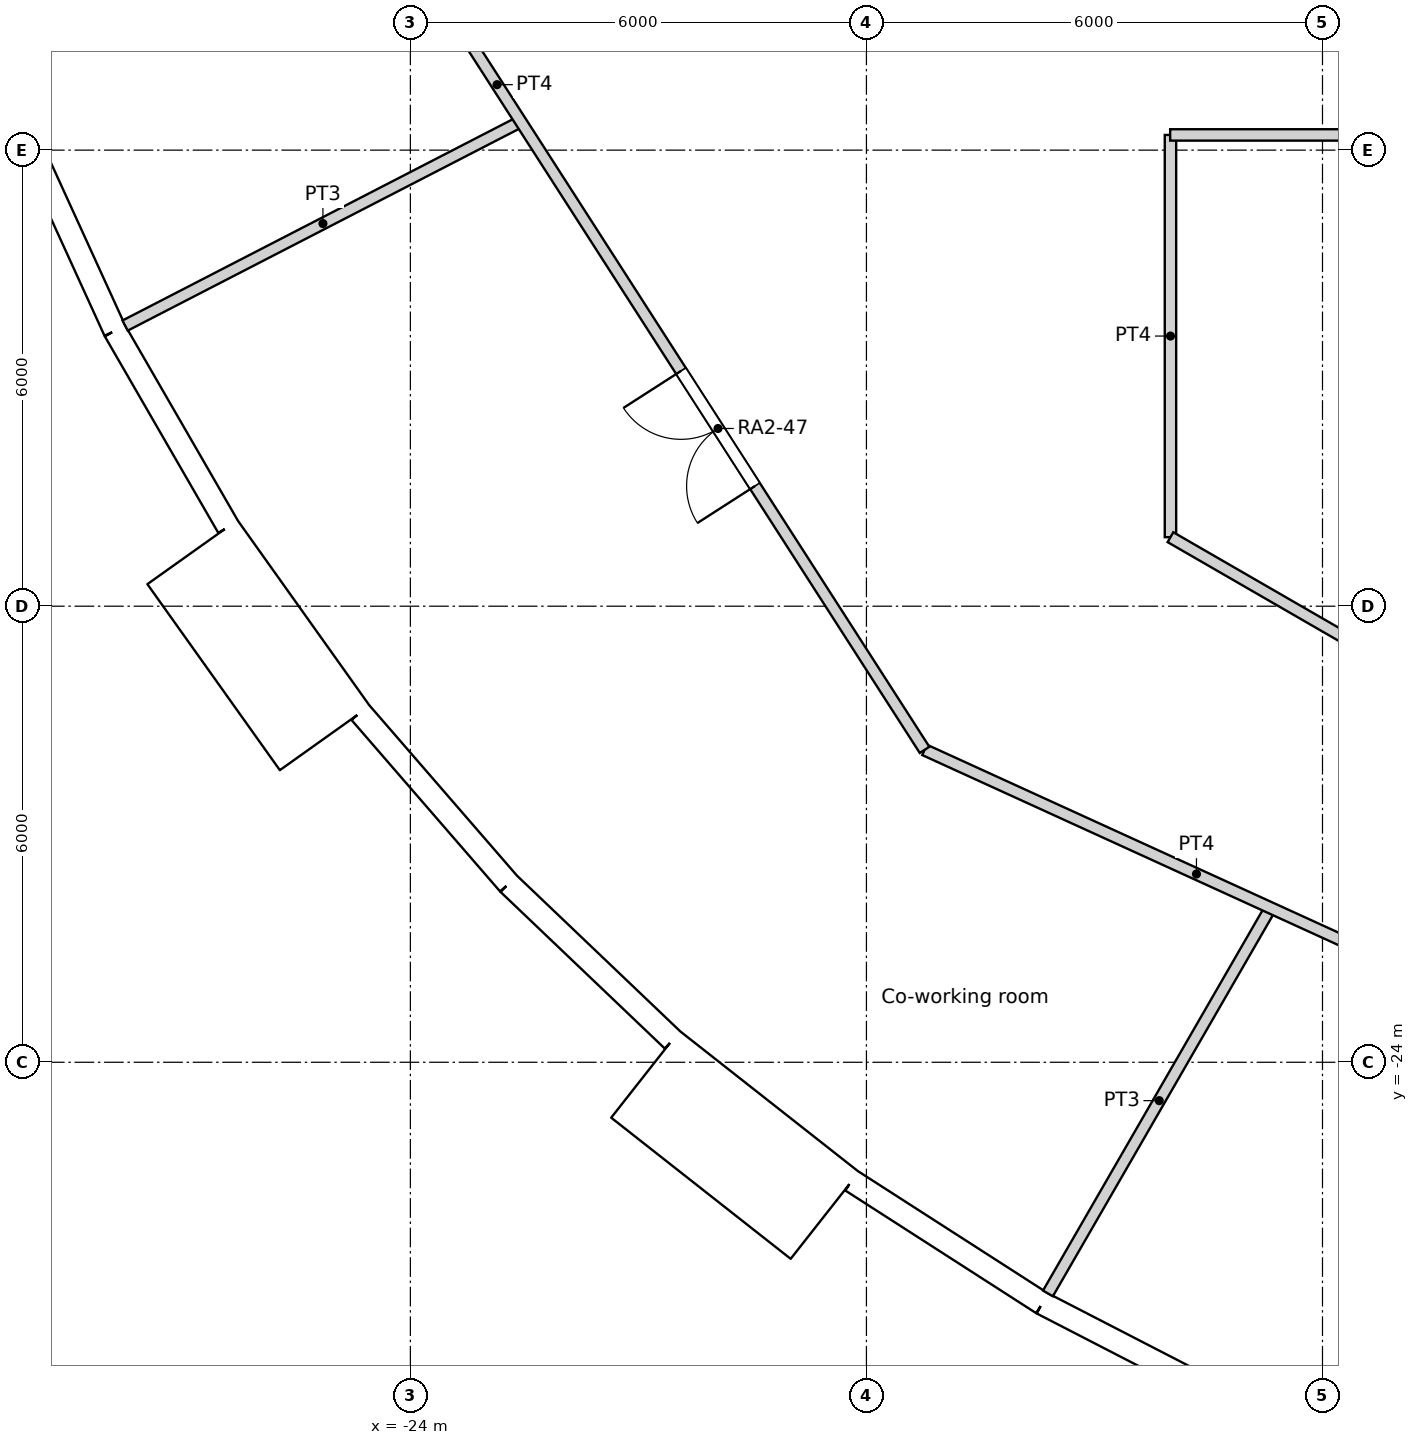
"""IFC4 building model, lengths in metres.
Left out: names, types, materials, properties, quantities, classifications, styles, units other than length and angle.
Written with IfcOpenShell. Run it as: python <this file> out.ifc"""

import sys

from ifc_helpers import new_model, si_unit, direction, frame, frame_2d, origin, origin_2d, place, context, subcontext, project, spatial, rectangle, circle, extrude, element, fill, save


model = new_model("IFC4")
c1 = context("Model", 3, precision=1e-05, world=origin(), true_north=direction((0.0, 1.0)))
c2 = subcontext(c1, "Body", "Model", "MODEL_VIEW")
j1 = project(units=[si_unit("LENGTHUNIT", "METRE"), si_unit("PLANEANGLEUNIT", "RADIAN")], contexts=[c1])
p1 = place(None, origin())
s1 = spatial("IfcSite", under=j1, at=p1, CompositionType="ELEMENT")
p2 = place(p1, origin())
s2 = spatial("IfcBuilding", under=s1, at=p2, CompositionType="ELEMENT")
p3 = place(p2, frame((0.0, 0.0, 39.0)))
s3 = spatial("IfcBuildingStorey", under=s2, at=p3, CompositionType="ELEMENT", Elevation=39.0)
for number, where, z_axis, x_axis in (
    (1, (-26.909, -13.873, 0.0), (0.0, 0.0, 1.0), (1.0, 0.0, 0.0)),
    (2, (-23.797, -18.715, 0.0), (0.0, 0.0, 1.0), (1.0, 0.0, 0.0)),
    (3, (-19.826, -22.88, 0.0), (0.0, 0.0, 1.0), (1.0, 0.0, 0.0)),
    (4, (-15.137, -26.219, 0.0), (0.0, 0.0, 1.0), (1.0, 0.0, 0.0)),
):
    element("IfcColumn", number, at=place(p3, frame(where, z_axis=z_axis, x_axis=x_axis)), inside=s3, PredefinedType="COLUMN", context=c2, shape_type="SweptSolid", body=[
        extrude(circle(Radius=0.7, at=origin_2d()), origin(), (0.0, 0.0, 1.0), 3.6),
    ])
for number, where, z_axis, x_axis in (
    (5, (-20.509, -13.489, 0.0), (0.0, 0.0, 1.0), (1.0, 0.0, 0.0)),
    (6, (-16.846, -17.855, 0.0), (0.0, 0.0, 1.0), (1.0, 0.0, 0.0)),
    (7, (-12.274, -21.259, 0.0), (0.0, 0.0, 1.0), (1.0, 0.0, 0.0)),
):
    element("IfcColumn", number, at=place(p3, frame(where, z_axis=z_axis, x_axis=x_axis)), inside=s3, PredefinedType="COLUMN", context=c2, shape_type="SweptSolid", body=[
        extrude(circle(Radius=0.75, at=origin_2d()), origin(), (0.0, 0.0, 1.0), 3.6),
    ])
p4 = place(p3, frame((-13.798, -12.802, 0.0), z_axis=(0.0, 0.0, 1.0), x_axis=(1.0, 0.0, 0.0)))
e8 = element("IfcColumn", 8, at=p4, inside=s3, PredefinedType="COLUMN", context=c2, shape_type="SweptSolid", body=[
    extrude(circle(Radius=0.8, at=origin_2d()), origin(), (0.0, 0.0, 1.0), 3.6),
])
p5 = place(p3, frame((-29.125, -11.666, 0.0), z_axis=(0.0, 0.0, 1.0), x_axis=(0.415407317162, -0.909635509888, 0.0)))
e9 = element("IfcWall", 9, at=p5, inside=s3, PredefinedType="SOLIDWALL", context=c2, shape_type="SweptSolid", body=[
    extrude(rectangle(XDim=2.98, YDim=0.3, at=frame_2d((1.49, 0.0))), origin(), (0.0, 0.0, 1.0), 3.15),
])
p6 = place(p5, frame((1.49, 0.0, 1.55)))
e10 = element("IfcOpeningElement", 10, at=p6, cuts=e9, PredefinedType="OPENING", context=c2, shape_type="SweptSolid", body=[
    extrude(circle(Radius=0.9, at=origin_2d()), frame((0.0, 0.16, 0.0), z_axis=(0.0, -1.0, 0.0), x_axis=(1.0, 0.0, 0.0)), (0.0, 0.0, 1.0), 0.32),
])
p7 = place(p3, frame((-27.887, -14.377, 0.0), z_axis=(0.0, 0.0, 1.0), x_axis=(0.499999078476, -0.866025935826, 0.0)))
e11 = element("IfcWall", 11, at=p7, inside=s3, PredefinedType="SOLIDWALL", context=c2, shape_type="SweptSolid", body=[
    extrude(rectangle(XDim=2.979, YDim=0.3, at=frame_2d((1.49, 0.0))), origin(), (0.0, 0.0, 1.0), 3.15),
])
p8 = place(p7, frame((1.49, 0.0, 1.55)))
e12 = element("IfcOpeningElement", 12, at=p8, cuts=e11, PredefinedType="OPENING", context=c2, shape_type="SweptSolid", body=[
    extrude(circle(Radius=0.9, at=origin_2d()), frame((0.0, 0.16, 0.0), z_axis=(0.0, -1.0, 0.0), x_axis=(1.0, 0.0, 0.0)), (0.0, 0.0, 1.0), 0.32),
])
p9 = place(p3, frame((-26.866, -17.29, -0.45), z_axis=(0.0, 0.0, 1.0), x_axis=(0.580090570606, -0.814551981088, 0.0)))
e13 = element("IfcWall", 13, at=p9, inside=s3, PredefinedType="ELEMENTEDWALL", context=c2, shape_type="SweptSolid", body=[
    extrude(rectangle(XDim=3.0, YDim=1.45, at=frame_2d((1.5, 0.0))), origin(), (0.0, 0.0, 1.0), 3.6),
])
p10 = place(p9, frame((1.5, 0.0, 2.0)))
e14 = element("IfcOpeningElement", 14, at=p10, cuts=e13, PredefinedType="OPENING", context=c2, shape_type="SweptSolid", body=[
    extrude(circle(Radius=0.9, at=origin_2d()), frame((0.0, 0.735, 0.0), z_axis=(0.0, -1.0, 0.0), x_axis=(1.0, 0.0, 0.0)), (0.0, 0.0, 1.0), 1.47),
])
p11 = place(p3, frame((-24.658, -19.399, 0.0), z_axis=(0.0, 0.0, 1.0), x_axis=(0.654830712471, -0.755775587066, 0.0)))
e15 = element("IfcWall", 15, at=p11, inside=s3, PredefinedType="SOLIDWALL", context=c2, shape_type="SweptSolid", body=[
    extrude(rectangle(XDim=2.98, YDim=0.3, at=frame_2d((1.49, 0.0))), origin(), (0.0, 0.0, 1.0), 3.15),
])
p12 = place(p11, frame((1.49, 0.0, 1.55)))
e16 = element("IfcOpeningElement", 16, at=p12, cuts=e15, PredefinedType="OPENING", context=c2, shape_type="SweptSolid", body=[
    extrude(circle(Radius=0.9, at=origin_2d()), frame((0.0, 0.16, 0.0), z_axis=(0.0, -1.0, 0.0), x_axis=(1.0, 0.0, 0.0)), (0.0, 0.0, 1.0), 0.32),
])
p13 = place(p3, frame((-22.707, -21.651, 0.0), z_axis=(0.0, 0.0, 1.0), x_axis=(0.723744206617, -0.690068346896, 0.0)))
e17 = element("IfcWall", 17, at=p13, inside=s3, PredefinedType="SOLIDWALL", context=c2, shape_type="SweptSolid", body=[
    extrude(rectangle(XDim=2.98, YDim=0.3, at=frame_2d((1.49, 0.0))), origin(), (0.0, 0.0, 1.0), 3.15),
])
p14 = place(p13, frame((1.49, 0.0, 1.55)))
e18 = element("IfcOpeningElement", 18, at=p14, cuts=e17, PredefinedType="OPENING", context=c2, shape_type="SweptSolid", body=[
    extrude(circle(Radius=0.9, at=origin_2d()), frame((0.0, 0.16, 0.0), z_axis=(0.0, -1.0, 0.0), x_axis=(1.0, 0.0, 0.0)), (0.0, 0.0, 1.0), 0.32),
])
p15 = place(p3, frame((-20.907, -24.159, -0.45), z_axis=(0.0, 0.0, 1.0), x_axis=(0.786049992888, -0.618162930529, 0.0)))
e19 = element("IfcWall", 19, at=p15, inside=s3, PredefinedType="ELEMENTEDWALL", context=c2, shape_type="SweptSolid", body=[
    extrude(rectangle(XDim=3.0, YDim=1.45, at=frame_2d((1.5, 0.0))), origin(), (0.0, 0.0, 1.0), 3.6),
])
p16 = place(p15, frame((1.5, 0.0, 2.0)))
e20 = element("IfcOpeningElement", 20, at=p16, cuts=e19, PredefinedType="OPENING", context=c2, shape_type="SweptSolid", body=[
    extrude(circle(Radius=0.9, at=origin_2d()), frame((0.0, 0.735, 0.0), z_axis=(0.0, -1.0, 0.0), x_axis=(1.0, 0.0, 0.0)), (0.0, 0.0, 1.0), 1.47),
])
p17 = place(p3, frame((-18.194, -25.56, 0.0), z_axis=(0.0, 0.0, 1.0), x_axis=(0.84122372879, -0.540687190639, 0.0)))
e21 = element("IfcWall", 21, at=p17, inside=s3, PredefinedType="SOLIDWALL", context=c2, shape_type="SweptSolid", body=[
    extrude(rectangle(XDim=2.98, YDim=0.3, at=frame_2d((1.49, 0.0))), origin(), (0.0, 0.0, 1.0), 3.15),
])
p18 = place(p17, frame((1.49, 0.0, 1.55)))
e22 = element("IfcOpeningElement", 22, at=p18, cuts=e21, PredefinedType="OPENING", context=c2, shape_type="SweptSolid", body=[
    extrude(circle(Radius=0.9, at=origin_2d()), frame((0.0, 0.16, 0.0), z_axis=(0.0, -1.0, 0.0), x_axis=(1.0, 0.0, 0.0)), (0.0, 0.0, 1.0), 0.32),
])
p19 = place(p3, frame((-15.687, -27.171, 0.0), z_axis=(0.0, 0.0, 1.0), x_axis=(0.888853225096, -0.4581920386, 0.0)))
e23 = element("IfcWall", 23, at=p19, inside=s3, PredefinedType="SOLIDWALL", context=c2, shape_type="SweptSolid", body=[
    extrude(rectangle(XDim=2.979, YDim=0.3, at=frame_2d((1.49, 0.0))), origin(), (0.0, 0.0, 1.0), 3.15),
])
p20 = place(p19, frame((1.49, 0.0, 1.55)))
e24 = element("IfcOpeningElement", 24, at=p20, cuts=e23, PredefinedType="OPENING", context=c2, shape_type="SweptSolid", body=[
    extrude(circle(Radius=0.9, at=origin_2d()), frame((0.0, 0.16, 0.0), z_axis=(0.0, -1.0, 0.0), x_axis=(1.0, 0.0, 0.0)), (0.0, 0.0, 1.0), 0.32),
])
p21 = place(p3, frame((-14.004, -11.8, 0.0), z_axis=(0.0, 0.0, 1.0), x_axis=(1.0, 0.0, 0.0)))
e25 = element("IfcWall", 25, at=p21, inside=s3, PredefinedType="PARTITIONING", context=c2, shape_type="SweptSolid", body=[
    extrude(rectangle(XDim=12.816, YDim=0.15, at=frame_2d((6.408, 0.0))), origin(), (0.0, 0.0, 1.0), 3.15),
])
p22 = place(p21, frame((5.933, 0.0, 0.0)))
e26 = element("IfcOpeningElement", 26, at=p22, cuts=e25, PredefinedType="OPENING", context=c2, shape_type="SweptSolid", body=[
    extrude(rectangle(XDim=0.95, YDim=2.1, at=frame_2d((0.475, 1.05))), frame((0.0, 0.075, 0.0), z_axis=(0.0, -1.0, 0.0), x_axis=(1.0, 0.0, 0.0)), (0.0, 0.0, 1.0), 0.15),
])
p23 = place(p3, frame((-14.0, -17.092, 0.0), z_axis=(0.0, 0.0, 1.0), x_axis=(0.0, 1.0, 0.0)))
e27 = element("IfcWall", 27, at=p23, inside=s3, PredefinedType="PARTITIONING", context=c2, shape_type="SweptSolid", body=[
    extrude(rectangle(XDim=5.292, YDim=0.15, at=frame_2d((2.646, 0.0))), origin(), (0.0, 0.0, 1.0), 3.15),
])
p24 = place(p3, frame((-25.253, -7.415, 0.0), z_axis=(0.0, 0.0, 1.0), x_axis=(0.540656073354, -0.841243728265, 0.0)))
e28 = element("IfcWall", 28, at=p24, inside=s3, PredefinedType="PARTITIONING", context=c2, shape_type="SweptSolid", body=[
    extrude(rectangle(XDim=14.829, YDim=0.15, at=frame_2d((7.415, 0.0))), origin(), (0.0, 0.0, 1.0), 3.15),
])
p25 = place(p24, frame((8.903, 0.0, 0.0)))
e29 = element("IfcOpeningElement", 29, at=p25, cuts=e28, PredefinedType="OPENING", context=c2, shape_type="SweptSolid", body=[
    extrude(rectangle(XDim=1.8, YDim=2.1, at=frame_2d((0.9, 1.05))), frame((0.0, 0.075, 0.0), z_axis=(0.0, -1.0, 0.0), x_axis=(1.0, 0.0, 0.0)), (0.0, 0.0, 1.0), 0.15),
])
p26 = place(p3, frame((-14.0, -17.092, 0.0), z_axis=(0.0, 0.0, 1.0), x_axis=(0.86602719091, -0.499996904595, 0.0)))
e30 = element("IfcWall", 30, at=p26, inside=s3, PredefinedType="PARTITIONING", context=c2, shape_type="SweptSolid", body=[
    extrude(rectangle(XDim=9.42, YDim=0.15, at=frame_2d((4.71, 0.0))), origin(), (0.0, 0.0, 1.0), 3.15),
])
p27 = place(p3, frame((-17.235, -19.89, 0.0), z_axis=(0.0, 0.0, 1.0), x_axis=(0.909645678785, -0.415385049163, 0.0)))
e31 = element("IfcWall", 31, at=p27, inside=s3, PredefinedType="PARTITIONING", context=c2, shape_type="SweptSolid", body=[
    extrude(rectangle(XDim=14.829, YDim=0.15, at=frame_2d((7.415, 0.0))), origin(), (0.0, 0.0, 1.0), 3.15),
])
p28 = place(p27, frame((7.914, 0.0, 0.0)))
e32 = element("IfcOpeningElement", 32, at=p28, cuts=e31, PredefinedType="OPENING", context=c2, shape_type="SweptSolid", body=[
    extrude(rectangle(XDim=1.8, YDim=2.1, at=frame_2d((0.9, 1.05))), frame((0.0, 0.075, 0.0), z_axis=(0.0, -1.0, 0.0), x_axis=(1.0, 0.0, 0.0)), (0.0, 0.0, 1.0), 0.15),
])
p29 = place(p3, frame((-27.753, -14.308, 0.0), z_axis=(0.0, 0.0, 1.0), x_axis=(0.88877955153, 0.45833493079, 0.0)))
e33 = element("IfcWall", 33, at=p29, inside=s3, PredefinedType="PARTITIONING", context=c2, shape_type="SweptSolid", body=[
    extrude(rectangle(XDim=5.856, YDim=0.15, at=frame_2d((2.928, 0.0))), origin(), (0.0, 0.0, 1.0), 3.15),
])
p30 = place(p3, frame((-15.612, -27.041, 0.0), z_axis=(0.0, 0.0, 1.0), x_axis=(0.499954606878, 0.86605160993, 0.0)))
e34 = element("IfcWall", 34, at=p30, inside=s3, PredefinedType="PARTITIONING", context=c2, shape_type="SweptSolid", body=[
    extrude(rectangle(XDim=5.856, YDim=0.15, at=frame_2d((2.928, 0.0))), origin(), (0.0, 0.0, 1.0), 3.15),
])
p31 = place(p6, origin())
e35 = element("IfcWindow", 35, at=p31, inside=s3, PartitioningType="SINGLE_PANEL", PredefinedType="WINDOW", context=c2, shape_type="SweptSolid", body=[
    extrude(circle(Radius=0.9, at=origin_2d()), frame((0.0, 0.12, 0.0), z_axis=(0.0, -1.0, 0.0), x_axis=(1.0, 0.0, 0.0)), (0.0, 0.0, 1.0), 0.1),
])
fill(e10, e35)
p32 = place(p8, origin())
e36 = element("IfcWindow", 36, at=p32, inside=s3, PartitioningType="SINGLE_PANEL", PredefinedType="WINDOW", context=c2, shape_type="SweptSolid", body=[
    extrude(circle(Radius=0.9, at=origin_2d()), frame((0.0, 0.12, 0.0), z_axis=(0.0, -1.0, 0.0), x_axis=(1.0, 0.0, 0.0)), (0.0, 0.0, 1.0), 0.1),
])
fill(e12, e36)
p33 = place(p10, origin())
e37 = element("IfcWindow", 37, at=p33, inside=s3, PartitioningType="SINGLE_PANEL", PredefinedType="WINDOW", context=c2, shape_type="SweptSolid", body=[
    extrude(circle(Radius=0.9, at=origin_2d()), frame((0.0, 0.695, 0.0), z_axis=(0.0, -1.0, 0.0), x_axis=(1.0, 0.0, 0.0)), (0.0, 0.0, 1.0), 0.1),
])
fill(e14, e37)
p34 = place(p12, origin())
e38 = element("IfcWindow", 38, at=p34, inside=s3, PartitioningType="SINGLE_PANEL", PredefinedType="WINDOW", context=c2, shape_type="SweptSolid", body=[
    extrude(circle(Radius=0.9, at=origin_2d()), frame((0.0, 0.12, 0.0), z_axis=(0.0, -1.0, 0.0), x_axis=(1.0, 0.0, 0.0)), (0.0, 0.0, 1.0), 0.1),
])
fill(e16, e38)
p35 = place(p14, origin())
e39 = element("IfcWindow", 39, at=p35, inside=s3, PartitioningType="SINGLE_PANEL", PredefinedType="WINDOW", context=c2, shape_type="SweptSolid", body=[
    extrude(circle(Radius=0.9, at=origin_2d()), frame((0.0, 0.12, 0.0), z_axis=(0.0, -1.0, 0.0), x_axis=(1.0, 0.0, 0.0)), (0.0, 0.0, 1.0), 0.1),
])
fill(e18, e39)
p36 = place(p16, origin())
e40 = element("IfcWindow", 40, at=p36, inside=s3, PartitioningType="SINGLE_PANEL", PredefinedType="WINDOW", context=c2, shape_type="SweptSolid", body=[
    extrude(circle(Radius=0.9, at=origin_2d()), frame((0.0, 0.695, 0.0), z_axis=(0.0, -1.0, 0.0), x_axis=(1.0, 0.0, 0.0)), (0.0, 0.0, 1.0), 0.1),
])
fill(e20, e40)
p37 = place(p18, origin())
e41 = element("IfcWindow", 41, at=p37, inside=s3, PartitioningType="SINGLE_PANEL", PredefinedType="WINDOW", context=c2, shape_type="SweptSolid", body=[
    extrude(circle(Radius=0.9, at=origin_2d()), frame((0.0, 0.12, 0.0), z_axis=(0.0, -1.0, 0.0), x_axis=(1.0, 0.0, 0.0)), (0.0, 0.0, 1.0), 0.1),
])
fill(e22, e41)
p38 = place(p20, origin())
e42 = element("IfcWindow", 42, at=p38, inside=s3, PartitioningType="SINGLE_PANEL", PredefinedType="WINDOW", context=c2, shape_type="SweptSolid", body=[
    extrude(circle(Radius=0.9, at=origin_2d()), frame((0.0, 0.12, 0.0), z_axis=(0.0, -1.0, 0.0), x_axis=(1.0, 0.0, 0.0)), (0.0, 0.0, 1.0), 0.1),
])
fill(e24, e42)
p39 = place(p25, origin())
e43 = element("IfcDoor", 43, at=p39, inside=s3, OperationType="DOUBLE_DOOR_SINGLE_SWING", PredefinedType="DOOR", context=c2, shape_type="SweptSolid", body=[
    extrude(rectangle(XDim=1.8, YDim=2.1, at=frame_2d((0.9, 1.05))), frame((0.0, 0.025, 0.0), z_axis=(0.0, -1.0, 0.0), x_axis=(1.0, 0.0, 0.0)), (0.0, 0.0, 1.0), 0.05),
])
fill(e29, e43)
save(model, sys.argv[1])
